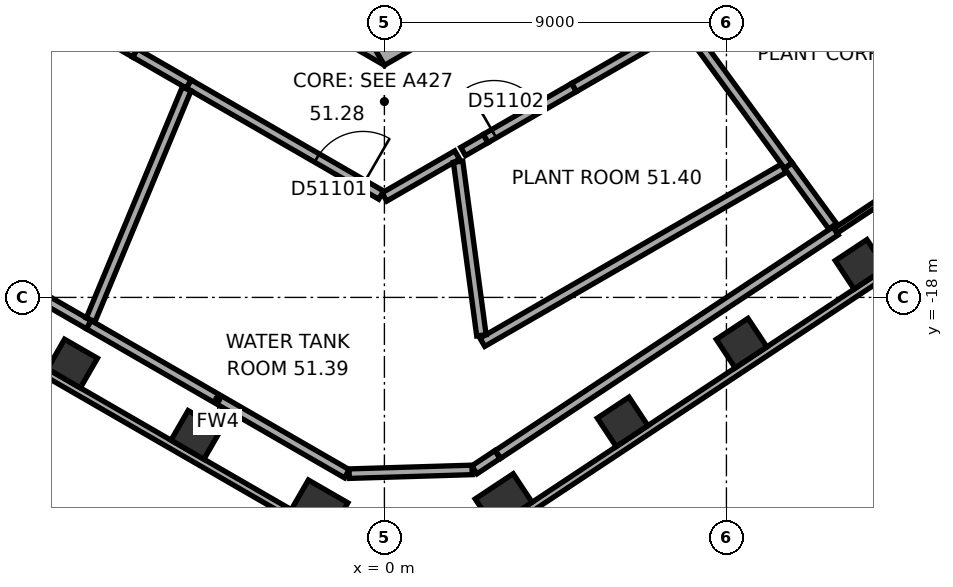
"""IFC4 building model, lengths in metres.
Left out: names, types, materials, properties, quantities, classifications, styles, units other than length and angle.
Written with IfcOpenShell. Run it as: python <this file> out.ifc"""

import sys

from ifc_helpers import new_model, si_unit, direction, frame, frame_2d, origin, origin_2d, place, context, subcontext, project, spatial, rectangle, extrude, element, fill, save


model = new_model("IFC4")
c1 = context("Model", 3, precision=1e-05, world=origin(), true_north=direction((0.0, 1.0)))
c2 = subcontext(c1, "Body", "Model", "MODEL_VIEW")
j1 = project(units=[si_unit("LENGTHUNIT", "METRE"), si_unit("PLANEANGLEUNIT", "RADIAN")], contexts=[c1])
p1 = place(None, origin())
s1 = spatial("IfcSite", under=j1, at=p1, CompositionType="ELEMENT")
p2 = place(p1, origin())
s2 = spatial("IfcBuilding", under=s1, at=p2, CompositionType="ELEMENT")
p3 = place(p2, frame((0.0, 0.0, 205.8)))
s3 = spatial("IfcBuildingStorey", under=s2, at=p3, CompositionType="ELEMENT", Elevation=205.8)
for number, where, z_axis, x_axis in (
    (1, (-8.208, -19.74, 0.0), (0.0, 0.0, 1.0), (0.866, -0.5, 0.0)),
    (2, (-4.958, -21.617, 0.0), (0.0, 0.0, 1.0), (0.866, -0.5, 0.0)),
):
    element("IfcColumn", number, at=place(p3, frame(where, z_axis=z_axis, x_axis=x_axis)), inside=s3, PredefinedType="COLUMN", context=c2, shape_type="SweptSolid", body=[
        extrude(rectangle(XDim=1.0, YDim=0.9, at=origin_2d()), origin(), (0.0, 0.0, 1.0), 4.8),
    ])
for number, where, z_axis, x_axis in (
    (3, (-1.706, -23.494, 0.0), (0.0, 0.0, 1.0), (0.866, -0.5, 0.0)),
    (4, (3.137, -23.346, 0.0), (0.0, 0.0, 1.0), (0.834, 0.552, 0.0)),
):
    element("IfcColumn", number, at=place(p3, frame(where, z_axis=z_axis, x_axis=x_axis)), inside=s3, PredefinedType="COLUMN", context=c2, shape_type="SweptSolid", body=[
        extrude(rectangle(XDim=1.2, YDim=0.9, at=origin_2d()), origin(), (0.0, 0.0, 1.0), 4.8),
    ])
for number, where, z_axis, x_axis in (
    (5, (6.268, -21.274, 0.0), (0.0, 0.0, 1.0), (0.834, 0.552, 0.0)),
    (6, (9.398, -19.202, 0.0), (0.0, 0.0, 1.0), (0.834, 0.552, 0.0)),
    (7, (12.529, -17.13, 0.0), (0.0, 0.0, 1.0), (0.834, 0.552, 0.0)),
):
    element("IfcColumn", number, at=place(p3, frame(where, z_axis=z_axis, x_axis=x_axis)), inside=s3, PredefinedType="COLUMN", context=c2, shape_type="SweptSolid", body=[
        extrude(rectangle(XDim=1.0, YDim=0.9, at=origin_2d()), origin(), (0.0, 0.0, 1.0), 4.8),
    ])
p4 = place(p3, frame((-10.1, -5.6, 0.0), z_axis=(0.0, 0.0, 1.0), x_axis=(0.866023897231, -0.500002609418, 0.0)))
e8 = element("IfcWall", 8, at=p4, inside=s3, PredefinedType="SHEAR", context=c2, shape_type="SweptSolid", body=[
    extrude(rectangle(XDim=11.894, YDim=0.8, at=frame_2d((5.947, 0.0))), origin(), (0.0, 0.0, 1.0), 4.8),
])
p5 = place(p4, frame((6.147, 0.0, 0.0)))
e9 = element("IfcOpeningElement", 9, at=p5, cuts=e8, PredefinedType="OPENING", context=c2, shape_type="SweptSolid", body=[
    extrude(rectangle(XDim=1.5, YDim=2.1, at=frame_2d((0.75, 1.05))), frame((0.0, 0.41, 0.0), z_axis=(0.0, -1.0, 0.0), x_axis=(1.0, 0.0, 0.0)), (0.0, 0.0, 1.0), 0.82),
])
p6 = place(p4, frame((1.597, 0.0, 0.0)))
e10 = element("IfcOpeningElement", 10, at=p6, cuts=e8, PredefinedType="OPENING", context=c2, shape_type="SweptSolid", body=[
    extrude(rectangle(XDim=1.1, YDim=2.1, at=frame_2d((0.55, 1.05))), frame((0.0, 0.41, 0.0), z_axis=(0.0, -1.0, 0.0), x_axis=(1.0, 0.0, 0.0)), (0.0, 0.0, 1.0), 0.82),
])
p7 = place(p4, frame((4.197, 0.0, 0.0)))
e11 = element("IfcOpeningElement", 11, at=p7, cuts=e8, PredefinedType="OPENING", context=c2, shape_type="SweptSolid", body=[
    extrude(rectangle(XDim=1.1, YDim=2.1, at=frame_2d((0.55, 1.05))), frame((0.0, 0.41, 0.0), z_axis=(0.0, -1.0, 0.0), x_axis=(1.0, 0.0, 0.0)), (0.0, 0.0, 1.0), 0.82),
])
p8 = place(p3, frame((-0.2, -11.547, 0.0), z_axis=(0.0, 0.0, 1.0), x_axis=(0.866023897231, 0.500002609418, 0.0)))
e12 = element("IfcWall", 12, at=p8, inside=s3, PredefinedType="SHEAR", context=c2, shape_type="SweptSolid", body=[
    extrude(rectangle(XDim=11.894, YDim=0.8, at=frame_2d((5.947, 0.0))), origin(), (0.0, 0.0, 1.0), 4.8),
])
p9 = place(p8, frame((2.497, 0.0, 0.0)))
e13 = element("IfcOpeningElement", 13, at=p9, cuts=e12, PredefinedType="OPENING", context=c2, shape_type="SweptSolid", body=[
    extrude(rectangle(XDim=1.1, YDim=2.1, at=frame_2d((0.55, 1.05))), frame((0.0, 0.41, 0.0), z_axis=(0.0, -1.0, 0.0), x_axis=(1.0, 0.0, 0.0)), (0.0, 0.0, 1.0), 0.82),
])
p10 = place(p8, frame((5.097, 0.0, 0.0)))
e14 = element("IfcOpeningElement", 14, at=p10, cuts=e12, PredefinedType="OPENING", context=c2, shape_type="SweptSolid", body=[
    extrude(rectangle(XDim=1.1, YDim=2.1, at=frame_2d((0.55, 1.05))), frame((0.0, 0.41, 0.0), z_axis=(0.0, -1.0, 0.0), x_axis=(1.0, 0.0, 0.0)), (0.0, 0.0, 1.0), 0.82),
])
p11 = place(p8, frame((7.697, 0.0, 0.0)))
e15 = element("IfcOpeningElement", 15, at=p11, cuts=e12, PredefinedType="OPENING", context=c2, shape_type="SweptSolid", body=[
    extrude(rectangle(XDim=1.1, YDim=2.1, at=frame_2d((0.55, 1.05))), frame((0.0, 0.41, 0.0), z_axis=(0.0, -1.0, 0.0), x_axis=(1.0, 0.0, 0.0)), (0.0, 0.0, 1.0), 0.82),
])
for number, where, z_axis, x_axis in (
    (16, (-18.789, -14.267, 0.0), (0.0, 0.0, 1.0), (0.866, -0.5, 0.0)),
    (17, (2.911, -24.156, 0.0), (0.0, 0.0, 1.0), (0.834, 0.552, 0.0)),
):
    element("IfcWall", number, at=place(p3, frame(where, z_axis=z_axis, x_axis=x_axis)), inside=s3, PredefinedType="STANDARD", context=c2, shape_type="SweptSolid", body=[
        extrude(rectangle(XDim=20.044, YDim=0.2, at=frame_2d((10.022, 0.0))), origin(), (0.0, 0.0, 1.0), 4.8),
    ])
p12 = place(p3, frame((-0.988, -22.639, 0.0), z_axis=(0.0, 0.0, 1.0), x_axis=(-0.866009406207, 0.500027707594, 0.0)))
e18 = element("IfcWall", 18, at=p12, inside=s3, PredefinedType="SOLIDWALL", context=c2, shape_type="SweptSolid", body=[
    extrude(rectangle(XDim=7.846, YDim=0.25, at=frame_2d((3.923, 0.0))), origin(), (0.0, 0.0, 1.0), 4.02),
])
p13 = place(p3, frame((2.308, -22.539, 0.0), z_axis=(0.0, 0.0, 1.0), x_axis=(-0.999533256151, -0.030549465606, 0.0)))
e19 = element("IfcWall", 19, at=p13, inside=s3, PredefinedType="SOLIDWALL", context=c2, shape_type="SweptSolid", body=[
    extrude(rectangle(XDim=3.237, YDim=0.25, at=frame_2d((1.618, 0.0))), origin(), (0.0, 0.0, 1.0), 4.52),
])
p14 = place(p3, frame((2.975, -22.135, 0.0), z_axis=(0.0, 0.0, 1.0), x_axis=(-0.833748378567, -0.552144583635, 0.0)))
e20 = element("IfcWall", 20, at=p14, inside=s3, PredefinedType="SOLIDWALL", context=c2, shape_type="SweptSolid", body=[
    extrude(rectangle(XDim=0.728, YDim=0.25, at=frame_2d((0.364, 0.0))), origin(), (0.0, 0.0, 1.0), 4.52),
])
p15 = place(p3, frame((-7.782, -18.716, 0.0), z_axis=(0.0, 0.0, 1.0), x_axis=(-0.86602598362, 0.499998995694, 0.0)))
e21 = element("IfcWall", 21, at=p15, inside=s3, PredefinedType="SOLIDWALL", context=c2, shape_type="SweptSolid", body=[
    extrude(rectangle(XDim=10.673, YDim=0.25, at=frame_2d((5.337, 0.0))), origin(), (0.0, 0.0, 1.0), 4.02),
])
p16 = place(p3, frame((11.873, -16.251, 0.0), z_axis=(0.0, 0.0, 1.0), x_axis=(-0.833861924464, -0.551973088953, 0.0)))
e22 = element("IfcWall", 22, at=p16, inside=s3, PredefinedType="SOLIDWALL", context=c2, shape_type="SweptSolid", body=[
    extrude(rectangle(XDim=10.651, YDim=0.25, at=frame_2d((5.326, 0.0))), origin(), (0.0, 0.0, 1.0), 4.02),
])
p17 = place(p3, frame((11.796, -16.128, 0.0), z_axis=(0.0, 0.0, 1.0), x_axis=(-0.59041584791, 0.807099204891, 0.0)))
e23 = element("IfcWall", 23, at=p17, inside=s3, PredefinedType="SOLIDWALL", context=c2, shape_type="SweptSolid", body=[
    extrude(rectangle(XDim=1.977, YDim=0.25, at=frame_2d((0.989, 0.0))), origin(), (0.0, 0.0, 1.0), 3.6),
])
p18 = place(p3, frame((0.0, -15.357, 0.0), z_axis=(0.0, 0.0, 1.0), x_axis=(0.866060565847, 0.499939092575, 0.0)))
e24 = element("IfcWall", 24, at=p18, inside=s3, PredefinedType="SOLIDWALL", context=c2, shape_type="SweptSolid", body=[
    extrude(rectangle(XDim=2.211, YDim=0.25, at=frame_2d((1.105, 0.0))), origin(), (0.0, 0.0, 1.0), 4.52),
])
p19 = place(p3, frame((-0.087, -15.308, 0.0), z_axis=(0.0, 0.0, 1.0), x_axis=(-0.866016588558, 0.50001526811, 0.0)))
e25 = element("IfcWall", 25, at=p19, inside=s3, PredefinedType="SOLIDWALL", context=c2, shape_type="SweptSolid", body=[
    extrude(rectangle(XDim=5.846, YDim=0.25, at=frame_2d((2.923, 0.0))), origin(), (0.0, 0.0, 1.0), 4.52),
])
p20 = place(p19, frame((0.55, 0.0, 0.0)))
e26 = element("IfcOpeningElement", 26, at=p20, cuts=e25, PredefinedType="OPENING", context=c2, shape_type="SweptSolid", body=[
    extrude(rectangle(XDim=1.4, YDim=2.1, at=frame_2d((0.7, 1.05))), frame((0.0, 0.135, 0.0), z_axis=(0.0, -1.0, 0.0), x_axis=(1.0, 0.0, 0.0)), (0.0, 0.0, 1.0), 0.27),
])
p21 = place(p3, frame((10.508, -14.603, 0.0), z_axis=(0.0, 0.0, 1.0), x_axis=(-0.86603774239, -0.499978628299, 0.0)))
e27 = element("IfcWall", 27, at=p21, inside=s3, PredefinedType="SOLIDWALL", context=c2, shape_type="SweptSolid", body=[
    extrude(rectangle(XDim=9.157, YDim=0.25, at=frame_2d((4.579, 0.0))), origin(), (0.0, 0.0, 1.0), 4.52),
])
p22 = place(p3, frame((1.939, -14.43, 0.0), z_axis=(0.0, 0.0, 1.0), x_axis=(0.133228901291, -0.991085293938, 0.0)))
e28 = element("IfcWall", 28, at=p22, inside=s3, PredefinedType="SOLIDWALL", context=c2, shape_type="SweptSolid", body=[
    extrude(rectangle(XDim=4.609, YDim=0.25, at=frame_2d((2.304, 0.0))), origin(), (0.0, 0.0, 1.0), 3.6),
])
p23 = place(p3, frame((2.667, -13.818, 0.0), z_axis=(0.0, 0.0, 1.0), x_axis=(-0.86630994195, -0.499506841272, 0.0)))
e29 = element("IfcWall", 29, at=p23, inside=s3, PredefinedType="SOLIDWALL", context=c2, shape_type="SweptSolid", body=[
    extrude(rectangle(XDim=0.686, YDim=0.25, at=frame_2d((0.343, 0.0))), origin(), (0.0, 0.0, 1.0), 4.52),
])
p24 = place(p3, frame((2.667, -13.818, 0.0), z_axis=(0.0, 0.0, 1.0), x_axis=(0.866017414952, 0.500013836808, 0.0)))
e30 = element("IfcWall", 30, at=p24, inside=s3, PredefinedType="SOLIDWALL", context=c2, shape_type="SweptSolid", body=[
    extrude(rectangle(XDim=2.684, YDim=0.25, at=frame_2d((1.342, 0.0))), origin(), (0.0, 0.0, 1.0), 4.52),
])
p25 = place(p24, frame((0.25, 0.0, 0.0)))
e31 = element("IfcOpeningElement", 31, at=p25, cuts=e30, PredefinedType="OPENING", context=c2, shape_type="SweptSolid", body=[
    extrude(rectangle(XDim=1.4, YDim=2.1, at=frame_2d((0.7, 1.05))), frame((0.0, 0.135, 0.0), z_axis=(0.0, -1.0, 0.0), x_axis=(1.0, 0.0, 0.0)), (0.0, 0.0, 1.0), 0.27),
])
p26 = place(p3, frame((-5.203, -12.514, 0.0), z_axis=(0.0, 0.0, 1.0), x_axis=(-0.383964269763, -0.923347951503, 0.0)))
e32 = element("IfcWall", 32, at=p26, inside=s3, PredefinedType="SOLIDWALL", context=c2, shape_type="SweptSolid", body=[
    extrude(rectangle(XDim=6.577, YDim=0.25, at=frame_2d((3.289, 0.0))), origin(), (0.0, 0.0, 1.0), 3.6),
])
p27 = place(p3, frame((4.99, -12.476, 0.0), z_axis=(0.0, 0.0, 1.0), x_axis=(0.86607294768, 0.499917642513, 0.0)))
e33 = element("IfcWall", 33, at=p27, inside=s3, PredefinedType="SOLIDWALL", context=c2, shape_type="SweptSolid", body=[
    extrude(rectangle(XDim=3.356, YDim=0.25, at=frame_2d((1.678, 0.0))), origin(), (0.0, 0.0, 1.0), 4.52),
])
p28 = place(p3, frame((18.389, -11.933, 0.0), z_axis=(0.0, 0.0, 1.0), x_axis=(-0.833883730821, -0.551940144827, 0.0)))
e34 = element("IfcWall", 34, at=p28, inside=s3, PredefinedType="PARTITIONING", context=c2, shape_type="SweptSolid", body=[
    extrude(rectangle(XDim=7.806, YDim=0.15, at=frame_2d((3.903, 0.0))), origin(), (0.0, 0.0, 1.0), 4.02),
])
p29 = place(p3, frame((-6.563, -11.568, 0.0), z_axis=(0.0, 0.0, 1.0), x_axis=(0.866026229868, -0.499998569178, 0.0)))
e35 = element("IfcWall", 35, at=p29, inside=s3, PredefinedType="SOLIDWALL", context=c2, shape_type="SweptSolid", body=[
    extrude(rectangle(XDim=1.633, YDim=0.25, at=frame_2d((0.816, 0.0))), origin(), (0.0, 0.0, 1.0), 4.52),
])
p30 = place(p3, frame((7.968, -10.895, 0.0), z_axis=(0.0, 0.0, 1.0), x_axis=(0.590348117022, -0.807148747585, 0.0)))
e36 = element("IfcWall", 36, at=p30, inside=s3, PredefinedType="SOLIDWALL", context=c2, shape_type="SweptSolid", body=[
    extrude(rectangle(XDim=4.504, YDim=0.25, at=frame_2d((2.252, 0.0))), origin(), (0.0, 0.0, 1.0), 3.6),
])
p31 = place(p3, frame((-11.269, -8.852, 0.0), z_axis=(0.0, 0.0, 1.0), x_axis=(0.866019457076, -0.500010299859, 0.0)))
e37 = element("IfcWall", 37, at=p31, inside=s3, PredefinedType="SOLIDWALL", context=c2, shape_type="SweptSolid", body=[
    extrude(rectangle(XDim=5.433, YDim=0.25, at=frame_2d((2.717, 0.0))), origin(), (0.0, 0.0, 1.0), 4.52),
])
p32 = place(p31, frame((3.783, 0.0, 0.0)))
e38 = element("IfcOpeningElement", 38, at=p32, cuts=e37, PredefinedType="OPENING", context=c2, shape_type="SweptSolid", body=[
    extrude(rectangle(XDim=1.4, YDim=2.1, at=frame_2d((0.7, 1.05))), frame((0.0, 0.135, 0.0), z_axis=(0.0, -1.0, 0.0), x_axis=(1.0, 0.0, 0.0)), (0.0, 0.0, 1.0), 0.27),
])
p33 = place(p20, origin())
e39 = element("IfcDoor", 39, at=p33, inside=s3, OperationType="SINGLE_SWING_LEFT", PredefinedType="DOOR", context=c2, shape_type="SweptSolid", body=[
    extrude(rectangle(XDim=1.4, YDim=2.1, at=frame_2d((0.7, 1.05))), frame((0.0, 0.025, 0.0), z_axis=(0.0, -1.0, 0.0), x_axis=(1.0, 0.0, 0.0)), (0.0, 0.0, 1.0), 0.05),
])
fill(e26, e39)
p34 = place(p25, origin())
e40 = element("IfcDoor", 40, at=p34, inside=s3, OperationType="SINGLE_SWING_LEFT", PredefinedType="DOOR", context=c2, shape_type="SweptSolid", body=[
    extrude(rectangle(XDim=1.4, YDim=2.1, at=frame_2d((0.7, 1.05))), frame((0.0, 0.025, 0.0), z_axis=(0.0, -1.0, 0.0), x_axis=(1.0, 0.0, 0.0)), (0.0, 0.0, 1.0), 0.05),
])
fill(e31, e40)
save(model, sys.argv[1])
